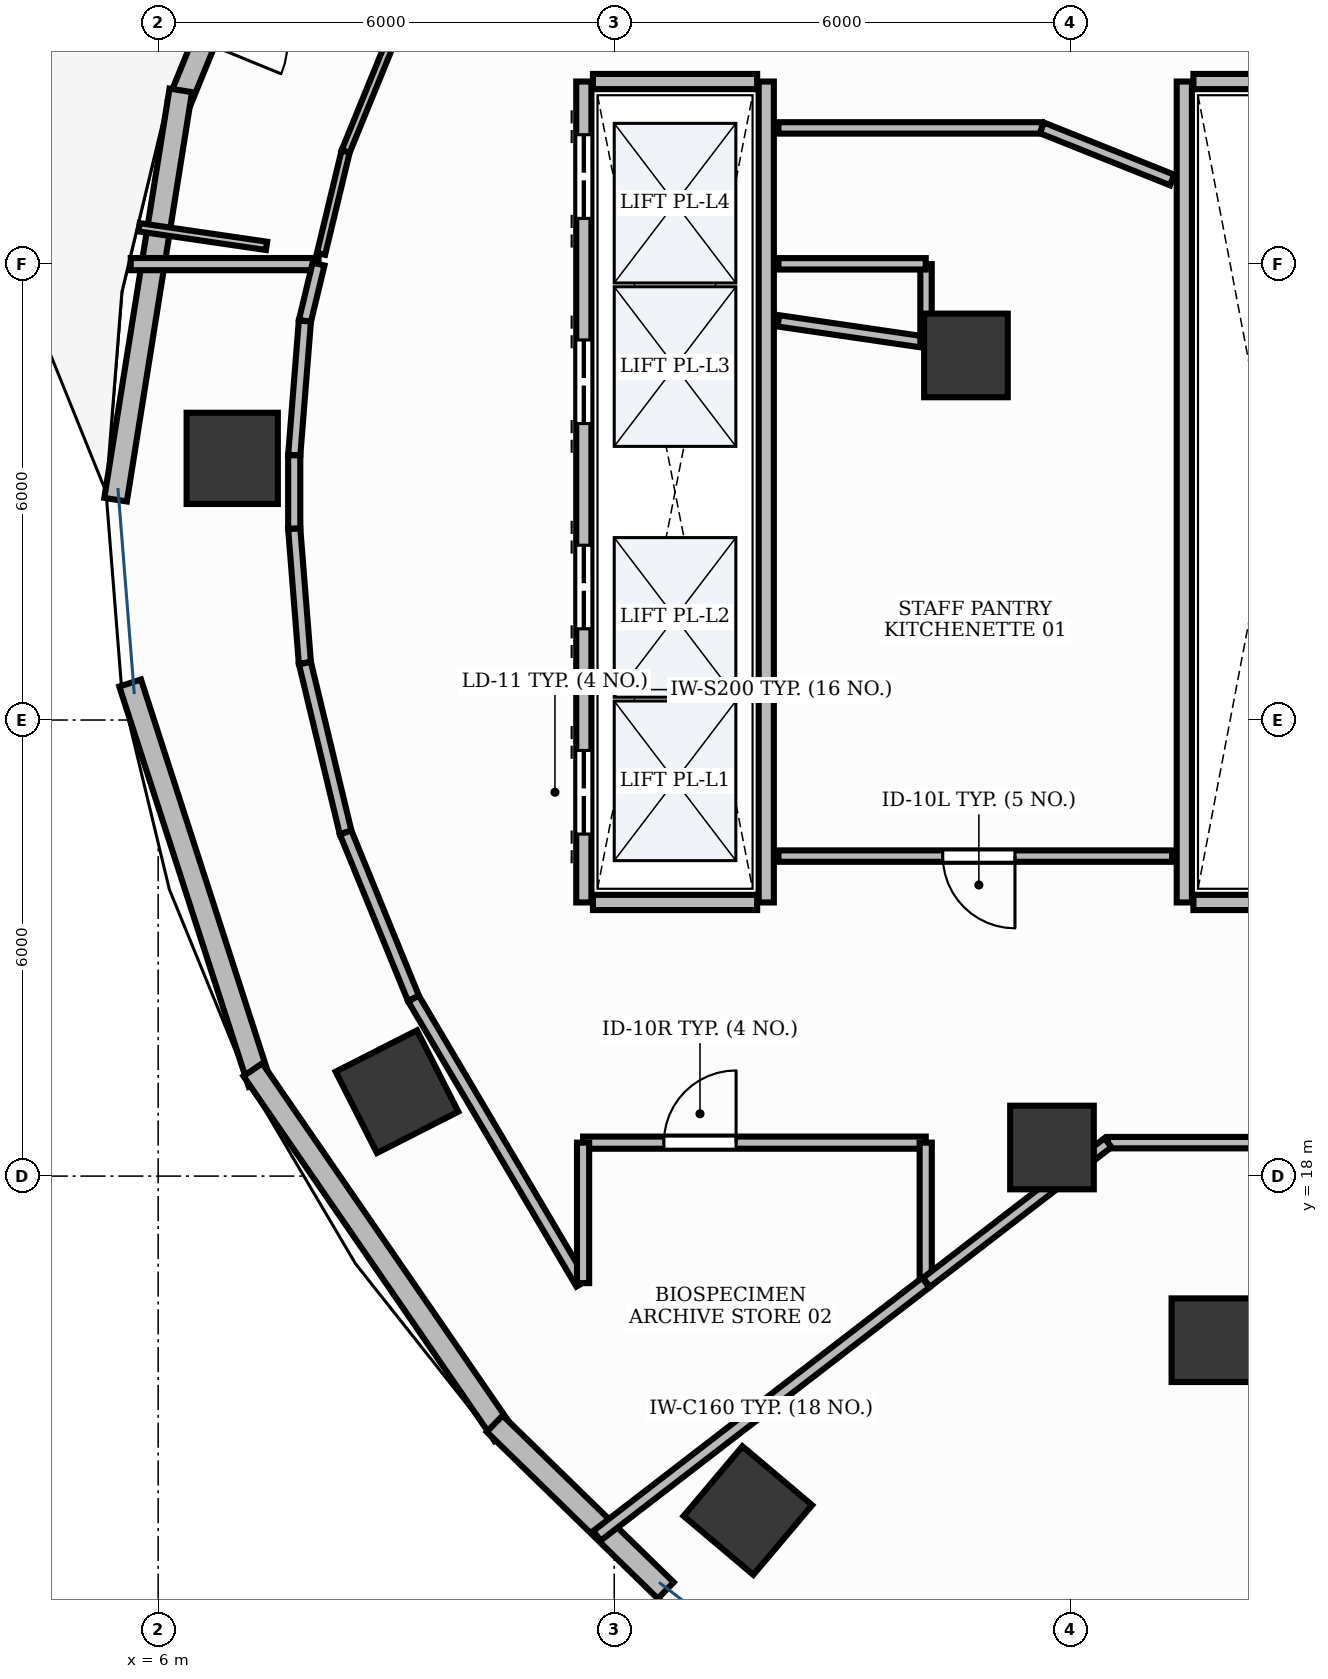
"""IFC4 building model, lengths in metres.
Left out: names, types, materials, properties, quantities, classifications, styles, units other than length and angle.
Written with IfcOpenShell. Run it as: python <this file> out.ifc"""

import sys

from ifc_helpers import new_model, si_unit, direction, frame, frame_2d, origin, origin_2d, place, context, subcontext, project, spatial, rectangle, extrude, element, fill, save


model = new_model("IFC4")
c1 = context("Model", 3, precision=1e-05, world=origin(), true_north=direction((0.0, 1.0)))
c2 = subcontext(c1, "Body", "Model", "MODEL_VIEW")
j1 = project(units=[si_unit("LENGTHUNIT", "METRE"), si_unit("PLANEANGLEUNIT", "RADIAN")], contexts=[c1])
p1 = place(None, origin())
s1 = spatial("IfcSite", under=j1, at=p1, CompositionType="ELEMENT")
p2 = place(p1, origin())
s2 = spatial("IfcBuilding", under=s1, at=p2, CompositionType="ELEMENT")
p3 = place(p2, frame((0.0, 0.0, 119.4)))
s3 = spatial("IfcBuildingStorey", under=s2, at=p3, CompositionType="ELEMENT", Elevation=119.4)
p4 = place(p3, frame((6.974, 27.442, -0.0), z_axis=(0.0, 0.0, 1.0), x_axis=(0.0, 1.0, 0.0)))
e1 = element("IfcColumn", 1, at=p4, inside=s3, PredefinedType="COLUMN", context=c2, shape_type="SweptSolid", body=[
    extrude(rectangle(XDim=1.2, YDim=1.2, at=origin_2d()), origin(), (0.0, 0.0, 1.0), 3.901),
])
p5 = place(p3, frame((16.627, 28.797, -0.0), z_axis=(0.0, 0.0, 1.0), x_axis=(1.0, 0.0, 0.0)))
e2 = element("IfcColumn", 2, at=p5, inside=s3, PredefinedType="COLUMN", context=c2, shape_type="SweptSolid", body=[
    extrude(rectangle(XDim=1.1, YDim=1.1, at=origin_2d()), origin(), (0.0, 0.0, 1.0), 3.901),
])
p6 = place(p3, frame((9.142, 19.111, -0.0), z_axis=(0.0, 0.0, 1.0), x_axis=(-0.453057191132, 0.891481453292, 0.0)))
e3 = element("IfcColumn", 3, at=p6, inside=s3, PredefinedType="COLUMN", context=c2, shape_type="SweptSolid", body=[
    extrude(rectangle(XDim=1.2, YDim=1.2, at=origin_2d()), origin(), (0.0, 0.0, 1.0), 3.901),
])
p7 = place(p3, frame((17.759, 18.376, -0.0), z_axis=(0.0, 0.0, 1.0), x_axis=(1.0, 0.0, 0.0)))
e4 = element("IfcColumn", 4, at=p7, inside=s3, PredefinedType="COLUMN", context=c2, shape_type="SweptSolid", body=[
    extrude(rectangle(XDim=1.1, YDim=1.1, at=origin_2d()), origin(), (0.0, 0.0, 1.0), 3.901),
])
p8 = place(p3, frame((13.758, 13.6, -0.0), z_axis=(0.0, 0.0, 1.0), x_axis=(-0.764246456939, 0.644924300253, 0.0)))
e5 = element("IfcColumn", 5, at=p8, inside=s3, PredefinedType="COLUMN", context=c2, shape_type="SweptSolid", body=[
    extrude(rectangle(XDim=1.2, YDim=1.2, at=origin_2d()), origin(), (0.0, 0.0, 1.0), 3.901),
])
p9 = place(p3, frame((19.883, 15.841, -0.0), z_axis=(0.0, 0.0, 1.0), x_axis=(1.0, 0.0, 0.0)))
e6 = element("IfcColumn", 6, at=p9, inside=s3, PredefinedType="COLUMN", context=c2, shape_type="SweptSolid", body=[
    extrude(rectangle(XDim=1.1, YDim=1.1, at=origin_2d()), origin(), (0.0, 0.0, 1.0), 3.901),
])
p10 = place(p3, frame((7.347, 34.741, 0.0), z_axis=(0.0, 0.0, 1.0), x_axis=(-0.378328361311, -0.925671459551, 0.0)))
e7 = element("IfcWall", 7, at=p10, inside=s3, PredefinedType="STANDARD", context=c2, shape_type="SweptSolid", body=[
    extrude(rectangle(XDim=2.841, YDim=0.3, at=frame_2d((1.421, 0.0))), origin(), (0.0, 0.0, 1.0), 3.9),
])
p11 = place(p10, frame((0.871, 0.0, 0.0)))
e8 = element("IfcOpeningElement", 8, at=p11, cuts=e7, PredefinedType="OPENING", context=c2, shape_type="SweptSolid", body=[
    extrude(rectangle(XDim=1.1, YDim=2.15, at=frame_2d((0.55, 1.075))), frame((0.0, 0.165, 0.0), z_axis=(0.0, -1.0, 0.0), x_axis=(1.0, 0.0, 0.0)), (0.0, 0.0, 1.0), 0.33),
])
p12 = place(p3, frame((6.297, 32.284, 0.0), z_axis=(0.0, 0.0, 1.0), x_axis=(-0.157279785013, -0.987554084203, 0.0)))
e9 = element("IfcWall", 9, at=p12, inside=s3, PredefinedType="STANDARD", context=c2, shape_type="SweptSolid", body=[
    extrude(rectangle(XDim=5.453, YDim=0.3, at=frame_2d((2.727, 0.0))), origin(), (0.0, 0.0, 1.0), 3.9),
])
p13 = place(p3, frame((5.632, 24.487, 0.0), z_axis=(0.0, 0.0, 1.0), x_axis=(0.307599470659, -0.951515930319, 0.0)))
e10 = element("IfcWall", 10, at=p13, inside=s3, PredefinedType="STANDARD", context=c2, shape_type="SweptSolid", body=[
    extrude(rectangle(XDim=5.534, YDim=0.3, at=frame_2d((2.767, 0.0))), origin(), (0.0, 0.0, 1.0), 3.47),
])
p14 = place(p3, frame((7.246, 19.399, 0.0), z_axis=(0.0, 0.0, 1.0), x_axis=(0.566825798999, -0.823837674296, 0.0)))
e11 = element("IfcWall", 11, at=p14, inside=s3, PredefinedType="STANDARD", context=c2, shape_type="SweptSolid", body=[
    extrude(rectangle(XDim=5.826, YDim=0.3, at=frame_2d((2.913, 0.0))), origin(), (0.0, 0.0, 1.0), 3.9),
])
p15 = place(p3, frame((10.428, 14.742, 0.0), z_axis=(0.0, 0.0, 1.0), x_axis=(0.716101112291, -0.69799655943, 0.0)))
e12 = element("IfcWall", 12, at=p15, inside=s3, PredefinedType="STANDARD", context=c2, shape_type="SweptSolid", body=[
    extrude(rectangle(XDim=3.142, YDim=0.3, at=frame_2d((1.571, 0.0))), origin(), (0.0, 0.0, 1.0), 3.9),
])
p16 = place(p3, frame((11.6, 21.6, 0.0), z_axis=(0.0, 0.0, 1.0), x_axis=(0.0, 1.0, 0.0)))
e13 = element("IfcWall", 13, at=p16, inside=s3, PredefinedType="PARTITIONING", context=c2, shape_type="SweptSolid", body=[
    extrude(rectangle(XDim=10.8, YDim=0.2, at=frame_2d((5.4, 0.0))), origin(), (0.0, 0.0, 1.0), 2.91),
])
p17 = place(p16, frame((0.9, 0.0, 0.0)))
e14 = element("IfcOpeningElement", 14, at=p17, cuts=e13, PredefinedType="OPENING", context=c2, shape_type="SweptSolid", body=[
    extrude(rectangle(XDim=1.1, YDim=2.2, at=frame_2d((0.55, 1.1))), frame((0.0, 0.115, 0.0), z_axis=(0.0, -1.0, 0.0), x_axis=(1.0, 0.0, 0.0)), (0.0, 0.0, 1.0), 0.23),
])
p18 = place(p16, frame((3.6, 0.0, 0.0)))
e15 = element("IfcOpeningElement", 15, at=p18, cuts=e13, PredefinedType="OPENING", context=c2, shape_type="SweptSolid", body=[
    extrude(rectangle(XDim=1.1, YDim=2.2, at=frame_2d((0.55, 1.1))), frame((0.0, 0.115, 0.0), z_axis=(0.0, -1.0, 0.0), x_axis=(1.0, 0.0, 0.0)), (0.0, 0.0, 1.0), 0.23),
])
p19 = place(p16, frame((6.3, 0.0, 0.0)))
e16 = element("IfcOpeningElement", 16, at=p19, cuts=e13, PredefinedType="OPENING", context=c2, shape_type="SweptSolid", body=[
    extrude(rectangle(XDim=1.1, YDim=2.2, at=frame_2d((0.55, 1.1))), frame((0.0, 0.115, 0.0), z_axis=(0.0, -1.0, 0.0), x_axis=(1.0, 0.0, 0.0)), (0.0, 0.0, 1.0), 0.23),
])
p20 = place(p16, frame((9.0, 0.0, 0.0)))
e17 = element("IfcOpeningElement", 17, at=p20, cuts=e13, PredefinedType="OPENING", context=c2, shape_type="SweptSolid", body=[
    extrude(rectangle(XDim=1.1, YDim=2.2, at=frame_2d((0.55, 1.1))), frame((0.0, 0.115, 0.0), z_axis=(0.0, -1.0, 0.0), x_axis=(1.0, 0.0, 0.0)), (0.0, 0.0, 1.0), 0.23),
])
p21 = place(p3, frame((14.0, 21.6, 0.0), z_axis=(0.0, 0.0, 1.0), x_axis=(0.0, 1.0, 0.0)))
e18 = element("IfcWall", 18, at=p21, inside=s3, PredefinedType="PARTITIONING", context=c2, shape_type="SweptSolid", body=[
    extrude(rectangle(XDim=10.8, YDim=0.2, at=frame_2d((5.4, 0.0))), origin(), (0.0, 0.0, 1.0), 2.91),
])
for number, where, z_axis, x_axis in (
    (19, (11.72, 21.6, 0.0), (0.0, 0.0, 1.0), (1.0, 0.0, 0.0)),
    (20, (11.72, 32.4, 0.0), (0.0, 0.0, 1.0), (1.0, 0.0, 0.0)),
):
    element("IfcWall", number, at=place(p3, frame(where, z_axis=z_axis, x_axis=x_axis)), inside=s3, PredefinedType="PARTITIONING", context=c2, shape_type="SweptSolid", body=[
        extrude(rectangle(XDim=2.16, YDim=0.2, at=frame_2d((1.08, 0.0))), origin(), (0.0, 0.0, 1.0), 2.91),
    ])
p22 = place(p3, frame((19.5, 21.6, 0.0), z_axis=(0.0, 0.0, 1.0), x_axis=(0.0, 1.0, 0.0)))
e21 = element("IfcWall", 21, at=p22, inside=s3, PredefinedType="PARTITIONING", context=c2, shape_type="SweptSolid", body=[
    extrude(rectangle(XDim=10.8, YDim=0.2, at=frame_2d((5.4, 0.0))), origin(), (0.0, 0.0, 1.0), 2.91),
])
for number, where, z_axis, x_axis in (
    (22, (19.62, 21.6, 0.0), (0.0, 0.0, 1.0), (1.0, 0.0, 0.0)),
    (23, (19.62, 32.4, 0.0), (0.0, 0.0, 1.0), (1.0, 0.0, 0.0)),
):
    element("IfcWall", number, at=place(p3, frame(where, z_axis=z_axis, x_axis=x_axis)), inside=s3, PredefinedType="PARTITIONING", context=c2, shape_type="SweptSolid", body=[
        extrude(rectangle(XDim=2.11, YDim=0.2, at=frame_2d((1.055, 0.0))), origin(), (0.0, 0.0, 1.0), 2.91),
    ])
p23 = place(p3, frame((19.34, 22.21, 0.0), z_axis=(0.0, 0.0, 1.0), x_axis=(-1.0, 0.0, 0.0)))
e24 = element("IfcWall", 24, at=p23, inside=s3, PredefinedType="PARTITIONING", context=c2, shape_type="SweptSolid", body=[
    extrude(rectangle(XDim=5.18, YDim=0.15, at=frame_2d((2.59, 0.0))), origin(), (0.0, 0.0, 1.0), 2.91),
])
p24 = place(p23, frame((2.068, 0.0, 0.0)))
e25 = element("IfcOpeningElement", 25, at=p24, cuts=e24, PredefinedType="OPENING", context=c2, shape_type="SweptSolid", body=[
    extrude(rectangle(XDim=0.95, YDim=2.15, at=frame_2d((0.475, 1.075))), frame((0.0, 0.09, 0.0), z_axis=(0.0, -1.0, 0.0), x_axis=(1.0, 0.0, 0.0)), (0.0, 0.0, 1.0), 0.18),
])
p25 = place(p3, frame((11.59, 18.44, 0.0), z_axis=(0.0, 0.0, 1.0), x_axis=(1.0, 0.0, 0.0)))
e26 = element("IfcWall", 26, at=p25, inside=s3, PredefinedType="PARTITIONING", context=c2, shape_type="SweptSolid", body=[
    extrude(rectangle(XDim=4.508, YDim=0.16, at=frame_2d((2.254, 0.0))), origin(), (0.0, 0.0, 1.0), 2.91),
])
p26 = place(p25, frame((1.063, 0.0, 0.0)))
e27 = element("IfcOpeningElement", 27, at=p26, cuts=e26, PredefinedType="OPENING", context=c2, shape_type="SweptSolid", body=[
    extrude(rectangle(XDim=0.95, YDim=2.15, at=frame_2d((0.475, 1.075))), frame((0.0, 0.095, 0.0), z_axis=(0.0, -1.0, 0.0), x_axis=(1.0, 0.0, 0.0)), (0.0, 0.0, 1.0), 0.19),
])
p27 = place(p3, frame((18.496, 18.44, 0.0), z_axis=(0.0, 0.0, 1.0), x_axis=(1.0, 0.0, 0.0)))
e28 = element("IfcWall", 28, at=p27, inside=s3, PredefinedType="PARTITIONING", context=c2, shape_type="SweptSolid", body=[
    extrude(rectangle(XDim=4.994, YDim=0.15, at=frame_2d((2.497, 0.0))), origin(), (0.0, 0.0, 1.0), 2.91),
])
p28 = place(p27, frame((2.135, 0.0, 0.0)))
e29 = element("IfcOpeningElement", 29, at=p28, cuts=e28, PredefinedType="OPENING", context=c2, shape_type="SweptSolid", body=[
    extrude(rectangle(XDim=0.95, YDim=2.15, at=frame_2d((0.475, 1.075))), frame((0.0, 0.09, 0.0), z_axis=(0.0, -1.0, 0.0), x_axis=(1.0, 0.0, 0.0)), (0.0, 0.0, 1.0), 0.18),
])
p29 = place(p3, frame((14.16, 29.251, 0.0), z_axis=(0.0, 0.0, 1.0), x_axis=(0.989536319699, -0.144283997718, 0.0)))
e30 = element("IfcWall", 30, at=p29, inside=s3, PredefinedType="PARTITIONING", context=c2, shape_type="SweptSolid", body=[
    extrude(rectangle(XDim=1.958, YDim=0.15, at=frame_2d((0.979, 0.0))), origin(), (0.0, 0.0, 1.0), 2.91),
])
p30 = place(p3, frame((16.102, 28.973, 0.0), z_axis=(0.0, 0.0, 1.0), x_axis=(0.0, 1.0, 0.0)))
e31 = element("IfcWall", 31, at=p30, inside=s3, PredefinedType="PARTITIONING", context=c2, shape_type="SweptSolid", body=[
    extrude(rectangle(XDim=1.025, YDim=0.15, at=frame_2d((0.512, 0.0))), origin(), (0.0, 0.0, 1.0), 2.91),
])
p31 = place(p3, frame((16.098, 30.002, 0.0), z_axis=(0.0, 0.0, 1.0), x_axis=(-1.0, 0.0, 0.0)))
e32 = element("IfcWall", 32, at=p31, inside=s3, PredefinedType="PARTITIONING", context=c2, shape_type="SweptSolid", body=[
    extrude(rectangle(XDim=1.938, YDim=0.15, at=frame_2d((0.969, 0.0))), origin(), (0.0, 0.0, 1.0), 2.91),
])
p32 = place(p3, frame((14.16, 31.79, 0.0), z_axis=(0.0, 0.0, 1.0), x_axis=(1.0, 0.0, 0.0)))
e33 = element("IfcWall", 33, at=p32, inside=s3, PredefinedType="PARTITIONING", context=c2, shape_type="SweptSolid", body=[
    extrude(rectangle(XDim=3.467, YDim=0.15, at=frame_2d((1.733, 0.0))), origin(), (0.0, 0.0, 1.0), 2.91),
])
p33 = place(p3, frame((17.626, 31.79, 0.0), z_axis=(0.0, 0.0, 1.0), x_axis=(0.928485814786, -0.371367865789, 0.0)))
e34 = element("IfcWall", 34, at=p33, inside=s3, PredefinedType="PARTITIONING", context=c2, shape_type="SweptSolid", body=[
    extrude(rectangle(XDim=1.845, YDim=0.15, at=frame_2d((0.923, 0.0))), origin(), (0.0, 0.0, 1.0), 2.91),
])
p34 = place(p3, frame((5.639, 29.998, 0.0), z_axis=(0.0, 0.0, 1.0), x_axis=(1.0, 0.0, 0.0)))
e35 = element("IfcWall", 35, at=p34, inside=s3, PredefinedType="PARTITIONING", context=c2, shape_type="SweptSolid", body=[
    extrude(rectangle(XDim=2.471, YDim=0.16, at=frame_2d((1.236, 0.0))), origin(), (0.0, 0.0, 1.0), 2.91),
])
p35 = place(p3, frame((8.11, 29.998, 0.0), z_axis=(0.0, 0.0, 1.0), x_axis=(-0.233781391942, -0.972289185779, 0.0)))
e36 = element("IfcWall", 36, at=p35, inside=s3, PredefinedType="PARTITIONING", context=c2, shape_type="SweptSolid", body=[
    extrude(rectangle(XDim=0.769, YDim=0.16, at=frame_2d((0.384, 0.0))), origin(), (0.0, 0.0, 1.0), 2.91),
])
p36 = place(p3, frame((7.93, 29.249, 0.0), z_axis=(0.0, 0.0, 1.0), x_axis=(-0.079131522864, -0.996864184375, 0.0)))
e37 = element("IfcWall", 37, at=p36, inside=s3, PredefinedType="PARTITIONING", context=c2, shape_type="SweptSolid", body=[
    extrude(rectangle(XDim=1.771, YDim=0.16, at=frame_2d((0.885, 0.0))), origin(), (0.0, 0.0, 1.0), 2.91),
])
p37 = place(p3, frame((7.79, 27.483, 0.0), z_axis=(0.0, 0.0, 1.0), x_axis=(0.0, -1.0, 0.0)))
e38 = element("IfcWall", 38, at=p37, inside=s3, PredefinedType="PARTITIONING", context=c2, shape_type="SweptSolid", body=[
    extrude(rectangle(XDim=0.966, YDim=0.16, at=frame_2d((0.483, 0.0))), origin(), (0.0, 0.0, 1.0), 2.91),
])
p38 = place(p3, frame((7.79, 26.516, 0.0), z_axis=(0.0, 0.0, 1.0), x_axis=(0.079131522864, -0.996864184375, 0.0)))
e39 = element("IfcWall", 39, at=p38, inside=s3, PredefinedType="PARTITIONING", context=c2, shape_type="SweptSolid", body=[
    extrude(rectangle(XDim=1.771, YDim=0.16, at=frame_2d((0.885, 0.0))), origin(), (0.0, 0.0, 1.0), 2.91),
])
p39 = place(p3, frame((7.93, 24.749, 0.0), z_axis=(0.0, 0.0, 1.0), x_axis=(0.233675196412, -0.972314713754, 0.0)))
e40 = element("IfcWall", 40, at=p39, inside=s3, PredefinedType="PARTITIONING", context=c2, shape_type="SweptSolid", body=[
    extrude(rectangle(XDim=2.291, YDim=0.16, at=frame_2d((1.146, 0.0))), origin(), (0.0, 0.0, 1.0), 2.91),
])
p40 = place(p3, frame((8.466, 22.52, 0.0), z_axis=(0.0, 0.0, 1.0), x_axis=(0.378306283753, -0.925680482495, 0.0)))
e41 = element("IfcWall", 41, at=p40, inside=s3, PredefinedType="PARTITIONING", context=c2, shape_type="SweptSolid", body=[
    extrude(rectangle(XDim=2.358, YDim=0.16, at=frame_2d((1.179, 0.0))), origin(), (0.0, 0.0, 1.0), 2.91),
])
p41 = place(p3, frame((9.359, 20.336, 0.0), z_axis=(0.0, 0.0, 1.0), x_axis=(0.508164254342, -0.86126017591, 0.0)))
e42 = element("IfcWall", 42, at=p41, inside=s3, PredefinedType="PARTITIONING", context=c2, shape_type="SweptSolid", body=[
    extrude(rectangle(XDim=4.353, YDim=0.16, at=frame_2d((2.177, 0.0))), origin(), (0.0, 0.0, 1.0), 2.91),
])
p42 = place(p3, frame((11.59, 16.592, 0.0), z_axis=(0.0, 0.0, 1.0), x_axis=(0.0, 1.0, 0.0)))
e43 = element("IfcWall", 43, at=p42, inside=s3, PredefinedType="PARTITIONING", context=c2, shape_type="SweptSolid", body=[
    extrude(rectangle(XDim=1.848, YDim=0.16, at=frame_2d((0.924, 0.0))), origin(), (0.0, 0.0, 1.0), 2.91),
])
p43 = place(p3, frame((16.098, 18.44, 0.0), z_axis=(0.0, 0.0, 1.0), x_axis=(0.0, -1.0, 0.0)))
e44 = element("IfcWall", 44, at=p43, inside=s3, PredefinedType="PARTITIONING", context=c2, shape_type="SweptSolid", body=[
    extrude(rectangle(XDim=1.841, YDim=0.16, at=frame_2d((0.92, 0.0))), origin(), (0.0, 0.0, 1.0), 2.91),
])
p44 = place(p3, frame((16.098, 16.599, 0.0), z_axis=(0.0, 0.0, 1.0), x_axis=(-0.792293030169, -0.610140766008, 0.0)))
e45 = element("IfcWall", 45, at=p44, inside=s3, PredefinedType="PARTITIONING", context=c2, shape_type="SweptSolid", body=[
    extrude(rectangle(XDim=5.459, YDim=0.16, at=frame_2d((2.729, 0.0))), origin(), (0.0, 0.0, 1.0), 2.91),
])
p45 = place(p3, frame((16.108, 16.601, 0.0), z_axis=(0.0, 0.0, 1.0), x_axis=(0.792313685483, 0.61011394329, 0.0)))
e46 = element("IfcWall", 46, at=p45, inside=s3, PredefinedType="PARTITIONING", context=c2, shape_type="SweptSolid", body=[
    extrude(rectangle(XDim=3.014, YDim=0.15, at=frame_2d((1.507, 0.0))), origin(), (0.0, 0.0, 1.0), 2.91),
])
p46 = place(p3, frame((9.358, 33.663, 0.0), z_axis=(0.0, 0.0, 1.0), x_axis=(-0.378306283753, -0.925680482495, 0.0)))
e47 = element("IfcWall", 47, at=p46, inside=s3, PredefinedType="MOVABLE", context=c2, shape_type="SweptSolid", body=[
    extrude(rectangle(XDim=2.358, YDim=0.11, at=frame_2d((1.179, 0.0))), origin(), (0.0, 0.0, 1.0), 2.91),
])
p47 = place(p3, frame((8.466, 31.479, 0.0), z_axis=(0.0, 0.0, 1.0), x_axis=(-0.233639910683, -0.972323193252, 0.0)))
e48 = element("IfcWall", 48, at=p47, inside=s3, PredefinedType="MOVABLE", context=c2, shape_type="SweptSolid", body=[
    extrude(rectangle(XDim=1.384, YDim=0.11, at=frame_2d((0.692, 0.0))), origin(), (0.0, 0.0, 1.0), 2.91),
])
p48 = place(p3, frame((7.426, 30.238, 0.0), z_axis=(0.0, 0.0, 1.0), x_axis=(-0.989524406919, 0.144365674976, 0.0)))
e49 = element("IfcWall", 49, at=p48, inside=s3, PredefinedType="MOVABLE", context=c2, shape_type="SweptSolid", body=[
    extrude(rectangle(XDim=1.695, YDim=0.11, at=frame_2d((0.847, 0.0))), origin(), (0.0, 0.0, 1.0), 2.91),
])
p49 = place(p17, origin())
e50 = element("IfcDoor", 50, at=p49, inside=s3, OperationType="DOUBLE_DOOR_SLIDING", PredefinedType="DOOR", context=c2, shape_type="SweptSolid", body=[
    extrude(rectangle(XDim=1.1, YDim=2.2, at=frame_2d((0.55, 1.1))), frame((0.0, 0.025, 0.0), z_axis=(0.0, -1.0, 0.0), x_axis=(1.0, 0.0, 0.0)), (0.0, 0.0, 1.0), 0.05),
])
fill(e14, e50)
p50 = place(p18, origin())
e51 = element("IfcDoor", 51, at=p50, inside=s3, OperationType="DOUBLE_DOOR_SLIDING", PredefinedType="DOOR", context=c2, shape_type="SweptSolid", body=[
    extrude(rectangle(XDim=1.1, YDim=2.2, at=frame_2d((0.55, 1.1))), frame((0.0, 0.025, 0.0), z_axis=(0.0, -1.0, 0.0), x_axis=(1.0, 0.0, 0.0)), (0.0, 0.0, 1.0), 0.05),
])
fill(e15, e51)
p51 = place(p19, origin())
e52 = element("IfcDoor", 52, at=p51, inside=s3, OperationType="DOUBLE_DOOR_SLIDING", PredefinedType="DOOR", context=c2, shape_type="SweptSolid", body=[
    extrude(rectangle(XDim=1.1, YDim=2.2, at=frame_2d((0.55, 1.1))), frame((0.0, 0.025, 0.0), z_axis=(0.0, -1.0, 0.0), x_axis=(1.0, 0.0, 0.0)), (0.0, 0.0, 1.0), 0.05),
])
fill(e16, e52)
p52 = place(p20, origin())
e53 = element("IfcDoor", 53, at=p52, inside=s3, OperationType="DOUBLE_DOOR_SLIDING", PredefinedType="DOOR", context=c2, shape_type="SweptSolid", body=[
    extrude(rectangle(XDim=1.1, YDim=2.2, at=frame_2d((0.55, 1.1))), frame((0.0, 0.025, 0.0), z_axis=(0.0, -1.0, 0.0), x_axis=(1.0, 0.0, 0.0)), (0.0, 0.0, 1.0), 0.05),
])
fill(e17, e53)
p53 = place(p24, origin())
e54 = element("IfcDoor", 54, at=p53, inside=s3, OperationType="SINGLE_SWING_LEFT", PredefinedType="DOOR", context=c2, shape_type="SweptSolid", body=[
    extrude(rectangle(XDim=0.95, YDim=2.15, at=frame_2d((0.475, 1.075))), frame((0.0, 0.025, 0.0), z_axis=(0.0, -1.0, 0.0), x_axis=(1.0, 0.0, 0.0)), (0.0, 0.0, 1.0), 0.05),
])
fill(e25, e54)
p54 = place(p26, origin())
e55 = element("IfcDoor", 55, at=p54, inside=s3, OperationType="SINGLE_SWING_RIGHT", PredefinedType="DOOR", context=c2, shape_type="SweptSolid", body=[
    extrude(rectangle(XDim=0.95, YDim=2.15, at=frame_2d((0.475, 1.075))), frame((0.0, 0.025, 0.0), z_axis=(0.0, -1.0, 0.0), x_axis=(1.0, 0.0, 0.0)), (0.0, 0.0, 1.0), 0.05),
])
fill(e27, e55)
save(model, sys.argv[1])
